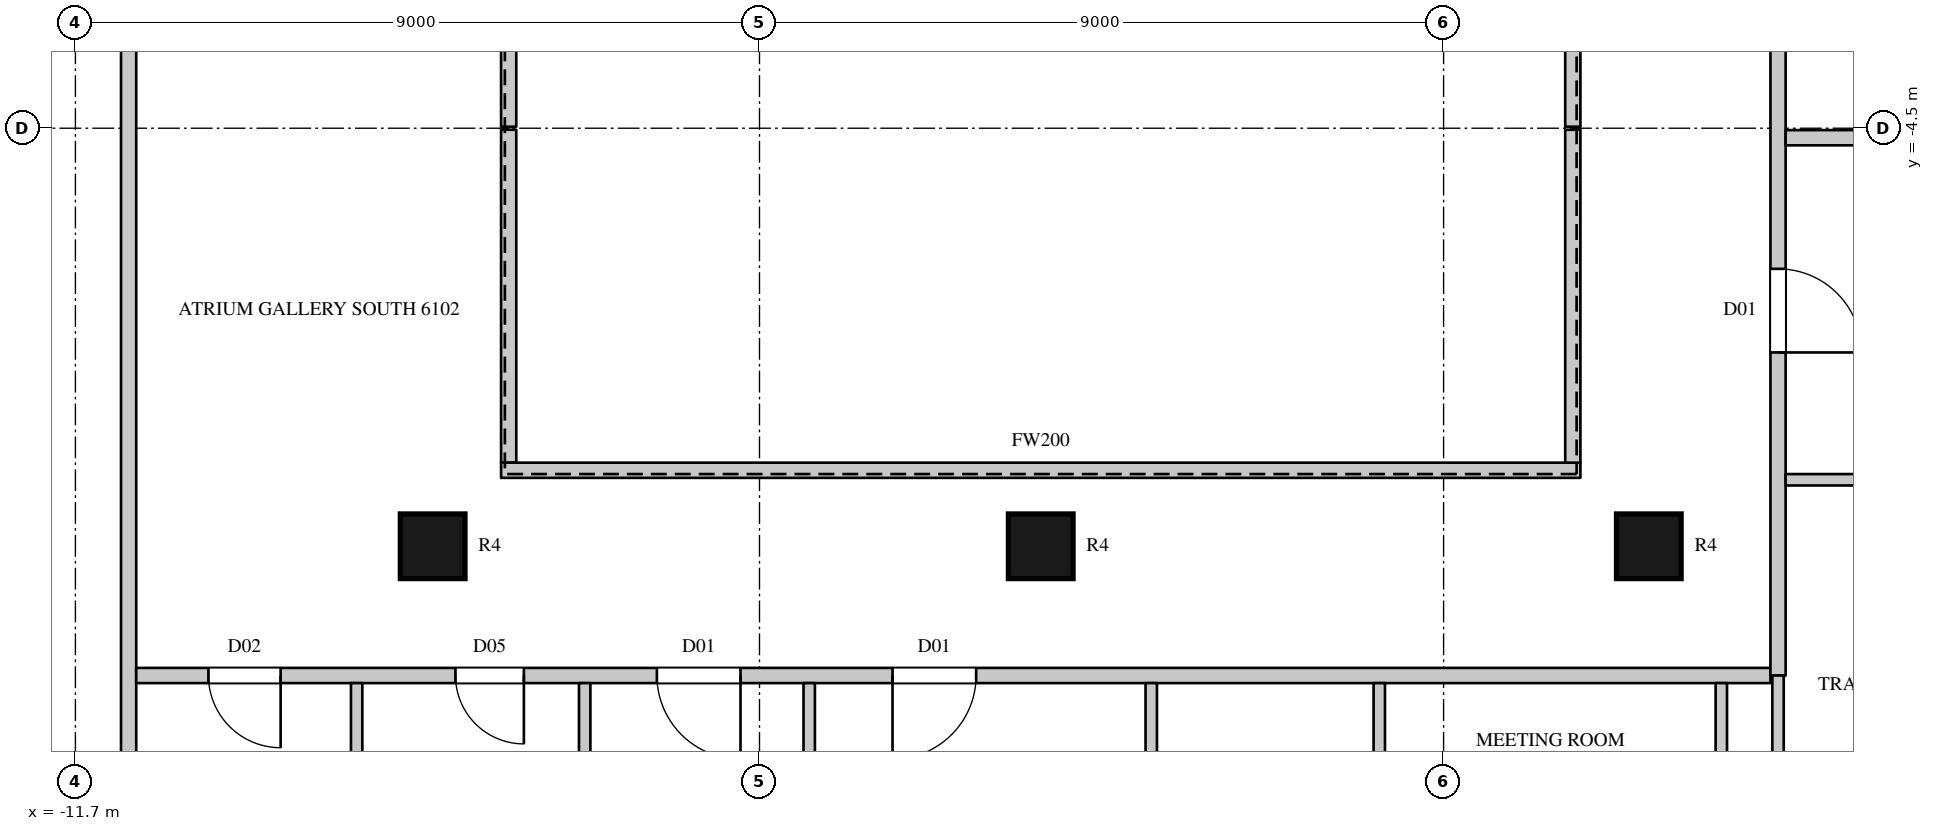
"""IFC4 building model, lengths in metres.
Left out: names, types, materials, properties, quantities, classifications, styles, units other than length and angle.
Written with IfcOpenShell. Run it as: python <this file> out.ifc"""

import sys

from ifc_helpers import new_model, si_unit, direction, frame, frame_2d, origin, origin_2d, place, context, subcontext, project, spatial, rectangle, circle, extrude, element, fill, save


model = new_model("IFC4")
c1 = context("Model", 3, precision=1e-05, world=origin(), true_north=direction((0.0, 1.0)))
c2 = subcontext(c1, "Body", "Model", "MODEL_VIEW")
j1 = project(units=[si_unit("LENGTHUNIT", "METRE"), si_unit("PLANEANGLEUNIT", "RADIAN")], contexts=[c1])
p1 = place(None, origin())
s1 = spatial("IfcSite", under=j1, at=p1, CompositionType="ELEMENT")
p2 = place(p1, origin())
s2 = spatial("IfcBuilding", under=s1, at=p2, CompositionType="ELEMENT")
p3 = place(p2, frame((0.0, 0.0, 272.1)))
s3 = spatial("IfcBuildingStorey", under=s2, at=p3, CompositionType="ELEMENT", Elevation=272.1)
for number, where, z_axis, x_axis in (
    (1, (-7.0, -10.0, 0.0), (0.0, 0.0, 1.0), (1.0, 0.0, 0.0)),
    (2, (1.0, -10.0, 0.0), (0.0, 0.0, 1.0), (1.0, 0.0, 0.0)),
    (3, (9.0, -10.0, 0.0), (0.0, 0.0, 1.0), (1.0, 0.0, 0.0)),
):
    element("IfcColumn", number, at=place(p3, frame(where, z_axis=z_axis, x_axis=x_axis)), inside=s3, PredefinedType="COLUMN", context=c2, shape_type="SweptSolid", body=[
        extrude(circle(Radius=0.425, at=origin_2d()), origin(), (0.0, 0.0, 1.0), 4.1),
    ])
p4 = place(p3, frame((-11.0, -14.8, 0.0), z_axis=(0.0, 0.0, 1.0), x_axis=(0.0, 1.0, 0.0)))
e4 = element("IfcWall", 4, at=p4, inside=s3, PredefinedType="PARTITIONING", context=c2, shape_type="SweptSolid", body=[
    extrude(rectangle(XDim=29.5, YDim=0.2, at=frame_2d((14.75, 0.0))), origin(), (0.0, 0.0, 1.0), 3.8),
])
p5 = place(p4, frame((17.9, 0.0, 0.0)))
e5 = element("IfcOpeningElement", 5, at=p5, cuts=e4, PredefinedType="OPENING", context=c2, shape_type="SweptSolid", body=[
    extrude(rectangle(XDim=1.5, YDim=2.4, at=frame_2d((0.75, 1.2))), frame((0.0, 0.11, 0.0), z_axis=(0.0, -1.0, 0.0), x_axis=(1.0, 0.0, 0.0)), (0.0, 0.0, 1.0), 0.22),
])
p6 = place(p3, frame((-10.9, -11.7, 0.0), z_axis=(0.0, 0.0, 1.0), x_axis=(1.0, 0.0, 0.0)))
e6 = element("IfcWall", 6, at=p6, inside=s3, PredefinedType="PARTITIONING", context=c2, shape_type="SweptSolid", body=[
    extrude(rectangle(XDim=21.5, YDim=0.2, at=frame_2d((10.75, 0.0))), origin(), (0.0, 0.0, 1.0), 3.8),
])
p7 = place(p6, frame((0.95, 0.0, 0.0)))
e7 = element("IfcOpeningElement", 7, at=p7, cuts=e6, PredefinedType="OPENING", context=c2, shape_type="SweptSolid", body=[
    extrude(rectangle(XDim=0.95, YDim=2.2, at=frame_2d((0.475, 1.1))), frame((0.0, 0.11, 0.0), z_axis=(0.0, -1.0, 0.0), x_axis=(1.0, 0.0, 0.0)), (0.0, 0.0, 1.0), 0.22),
])
p8 = place(p6, frame((4.2, 0.0, 0.0)))
e8 = element("IfcOpeningElement", 8, at=p8, cuts=e6, PredefinedType="OPENING", context=c2, shape_type="SweptSolid", body=[
    extrude(rectangle(XDim=0.9, YDim=2.2, at=frame_2d((0.45, 1.1))), frame((0.0, 0.11, 0.0), z_axis=(0.0, -1.0, 0.0), x_axis=(1.0, 0.0, 0.0)), (0.0, 0.0, 1.0), 0.22),
])
p9 = place(p6, frame((6.85, 0.0, 0.0)))
e9 = element("IfcOpeningElement", 9, at=p9, cuts=e6, PredefinedType="OPENING", context=c2, shape_type="SweptSolid", body=[
    extrude(rectangle(XDim=1.1, YDim=2.4, at=frame_2d((0.55, 1.2))), frame((0.0, 0.11, 0.0), z_axis=(0.0, -1.0, 0.0), x_axis=(1.0, 0.0, 0.0)), (0.0, 0.0, 1.0), 0.22),
])
p10 = place(p6, frame((9.95, 0.0, 0.0)))
e10 = element("IfcOpeningElement", 10, at=p10, cuts=e6, PredefinedType="OPENING", context=c2, shape_type="SweptSolid", body=[
    extrude(rectangle(XDim=1.1, YDim=2.4, at=frame_2d((0.55, 1.2))), frame((0.0, 0.11, 0.0), z_axis=(0.0, -1.0, 0.0), x_axis=(1.0, 0.0, 0.0)), (0.0, 0.0, 1.0), 0.22),
])
p11 = place(p3, frame((-6.0, -8.9, 0.0), z_axis=(0.0, 0.0, 1.0), x_axis=(0.0, 1.0, 0.0)))
e11 = element("IfcWall", 11, at=p11, inside=s3, PredefinedType="PARTITIONING", context=c2, shape_type="SweptSolid", body=[
    extrude(rectangle(XDim=4.38, YDim=0.2, at=frame_2d((2.19, 0.0))), origin(), (0.0, 0.0, 1.0), 3.8),
])
p12 = place(p3, frame((-6.1, -9.0, 0.0), z_axis=(0.0, 0.0, 1.0), x_axis=(1.0, 0.0, 0.0)))
e12 = element("IfcWall", 12, at=p12, inside=s3, PredefinedType="PARTITIONING", context=c2, shape_type="SweptSolid", body=[
    extrude(rectangle(XDim=14.2, YDim=0.2, at=frame_2d((7.1, 0.0))), origin(), (0.0, 0.0, 1.0), 3.8),
])
p13 = place(p3, frame((-6.0, -4.48, 0.0), z_axis=(0.0, 0.0, 1.0), x_axis=(0.0, 1.0, 0.0)))
e13 = element("IfcWall", 13, at=p13, inside=s3, PredefinedType="PARTITIONING", context=c2, shape_type="SweptSolid", body=[
    extrude(rectangle(XDim=13.38, YDim=0.2, at=frame_2d((6.69, 0.0))), origin(), (0.0, 0.0, 1.0), 3.8),
])
p14 = place(p3, frame((8.0, -8.9, 0.0), z_axis=(0.0, 0.0, 1.0), x_axis=(0.0, 1.0, 0.0)))
e14 = element("IfcWall", 14, at=p14, inside=s3, PredefinedType="PARTITIONING", context=c2, shape_type="SweptSolid", body=[
    extrude(rectangle(XDim=4.38, YDim=0.2, at=frame_2d((2.19, 0.0))), origin(), (0.0, 0.0, 1.0), 3.8),
])
p15 = place(p3, frame((8.0, -4.48, 0.0), z_axis=(0.0, 0.0, 1.0), x_axis=(0.0, 1.0, 0.0)))
e15 = element("IfcWall", 15, at=p15, inside=s3, PredefinedType="PARTITIONING", context=c2, shape_type="SweptSolid", body=[
    extrude(rectangle(XDim=13.38, YDim=0.2, at=frame_2d((6.69, 0.0))), origin(), (0.0, 0.0, 1.0), 3.8),
])
p16 = place(p3, frame((10.7, -11.7, 0.0), z_axis=(0.0, 0.0, 1.0), x_axis=(0.0, 1.0, 0.0)))
e16 = element("IfcWall", 16, at=p16, inside=s3, PredefinedType="PARTITIONING", context=c2, shape_type="SweptSolid", body=[
    extrude(rectangle(XDim=23.8, YDim=0.2, at=frame_2d((11.9, 0.0))), origin(), (0.0, 0.0, 1.0), 3.8),
])
p17 = place(p16, frame((12.35, 0.0, 0.0)))
e17 = element("IfcOpeningElement", 17, at=p17, cuts=e16, PredefinedType="OPENING", context=c2, shape_type="SweptSolid", body=[
    extrude(rectangle(XDim=1.5, YDim=2.4, at=frame_2d((0.75, 1.2))), frame((0.0, 0.11, 0.0), z_axis=(0.0, -1.0, 0.0), x_axis=(1.0, 0.0, 0.0)), (0.0, 0.0, 1.0), 0.22),
])
p18 = place(p16, frame((19.55, 0.0, 0.0)))
e18 = element("IfcOpeningElement", 18, at=p18, cuts=e16, PredefinedType="OPENING", context=c2, shape_type="SweptSolid", body=[
    extrude(rectangle(XDim=1.1, YDim=2.4, at=frame_2d((0.55, 1.2))), frame((0.0, 0.11, 0.0), z_axis=(0.0, -1.0, 0.0), x_axis=(1.0, 0.0, 0.0)), (0.0, 0.0, 1.0), 0.22),
])
p19 = place(p16, frame((4.25, 0.0, 0.0)))
e19 = element("IfcOpeningElement", 19, at=p19, cuts=e16, PredefinedType="OPENING", context=c2, shape_type="SweptSolid", body=[
    extrude(rectangle(XDim=1.1, YDim=2.4, at=frame_2d((0.55, 1.2))), frame((0.0, 0.11, 0.0), z_axis=(0.0, -1.0, 0.0), x_axis=(1.0, 0.0, 0.0)), (0.0, 0.0, 1.0), 0.22),
])
p20 = place(p3, frame((10.8, -4.625, 0.0), z_axis=(0.0, 0.0, 1.0), x_axis=(1.0, 0.0, 0.0)))
e20 = element("IfcWall", 20, at=p20, inside=s3, PredefinedType="PARTITIONING", context=c2, shape_type="SweptSolid", body=[
    extrude(rectangle(XDim=3.875, YDim=0.2, at=frame_2d((1.938, 0.0))), origin(), (0.0, 0.0, 1.0), 3.8),
])
for number, where, z_axis, x_axis in (
    (21, (-8.0, -24.04, 0.0), (0.0, 0.0, 1.0), (0.0, 1.0, 0.0)),
    (22, (-5.0, -24.04, 0.0), (0.0, 0.0, 1.0), (0.0, 1.0, 0.0)),
):
    element("IfcWall", number, at=place(p3, frame(where, z_axis=z_axis, x_axis=x_axis)), inside=s3, PredefinedType="PARTITIONING", context=c2, shape_type="SweptSolid", body=[
        extrude(rectangle(XDim=12.24, YDim=0.15, at=frame_2d((6.12, 0.0))), origin(), (0.0, 0.0, 1.0), 3.8),
    ])
p21 = place(p3, frame((-2.046, -23.441, 0.0), z_axis=(0.0, 0.0, 1.0), x_axis=(0.0, 1.0, 0.0)))
e23 = element("IfcWall", 23, at=p21, inside=s3, PredefinedType="PARTITIONING", context=c2, shape_type="SweptSolid", body=[
    extrude(rectangle(XDim=11.641, YDim=0.15, at=frame_2d((5.821, 0.0))), origin(), (0.0, 0.0, 1.0), 3.8),
])
p22 = place(p3, frame((2.454, -15.525, 0.0), z_axis=(0.0, 0.0, 1.0), x_axis=(0.0, 1.0, 0.0)))
e24 = element("IfcWall", 24, at=p22, inside=s3, PredefinedType="PARTITIONING", context=c2, shape_type="SweptSolid", body=[
    extrude(rectangle(XDim=3.725, YDim=0.15, at=frame_2d((1.862, 0.0))), origin(), (0.0, 0.0, 1.0), 3.8),
])
p23 = place(p22, frame((1.4, 0.0, 0.0)))
e25 = element("IfcOpeningElement", 25, at=p23, cuts=e24, PredefinedType="OPENING", context=c2, shape_type="SweptSolid", body=[
    extrude(rectangle(XDim=0.95, YDim=2.2, at=frame_2d((0.475, 1.1))), frame((0.0, 0.085, 0.0), z_axis=(0.0, -1.0, 0.0), x_axis=(1.0, 0.0, 0.0)), (0.0, 0.0, 1.0), 0.17),
])
for number, where, z_axis, x_axis in (
    (26, (5.454, -15.525, 0.0), (0.0, 0.0, 1.0), (0.0, 1.0, 0.0)),
    (27, (9.954, -15.525, 0.0), (0.0, 0.0, 1.0), (0.0, 1.0, 0.0)),
):
    element("IfcWall", number, at=place(p3, frame(where, z_axis=z_axis, x_axis=x_axis)), inside=s3, PredefinedType="PARTITIONING", context=c2, shape_type="SweptSolid", body=[
        extrude(rectangle(XDim=3.725, YDim=0.15, at=frame_2d((1.862, 0.0))), origin(), (0.0, 0.0, 1.0), 3.8),
    ])
p24 = place(p3, frame((10.7, -20.828, 0.0), z_axis=(0.0, 0.0, 1.0), x_axis=(0.0, 1.0, 0.0)))
e28 = element("IfcWall", 28, at=p24, inside=s3, PredefinedType="PARTITIONING", context=c2, shape_type="SweptSolid", body=[
    extrude(rectangle(XDim=9.128, YDim=0.15, at=frame_2d((4.564, 0.0))), origin(), (0.0, 0.0, 1.0), 3.8),
])
p25 = place(p3, frame((10.8, -9.125, 0.0), z_axis=(0.0, 0.0, 1.0), x_axis=(1.0, 0.0, 0.0)))
e29 = element("IfcWall", 29, at=p25, inside=s3, PredefinedType="PARTITIONING", context=c2, shape_type="SweptSolid", body=[
    extrude(rectangle(XDim=3.875, YDim=0.15, at=frame_2d((1.938, 0.0))), origin(), (0.0, 0.0, 1.0), 3.8),
])
p26 = place(p25, frame((2.65, 0.0, 0.0)))
e30 = element("IfcOpeningElement", 30, at=p26, cuts=e29, PredefinedType="OPENING", context=c2, shape_type="SweptSolid", body=[
    extrude(rectangle(XDim=0.95, YDim=2.2, at=frame_2d((0.475, 1.1))), frame((0.0, 0.085, 0.0), z_axis=(0.0, -1.0, 0.0), x_axis=(1.0, 0.0, 0.0)), (0.0, 0.0, 1.0), 0.17),
])
p27 = place(p7, origin())
e31 = element("IfcDoor", 31, at=p27, inside=s3, OperationType="SINGLE_SWING_LEFT", PredefinedType="DOOR", context=c2, shape_type="SweptSolid", body=[
    extrude(rectangle(XDim=0.95, YDim=2.2, at=frame_2d((0.475, 1.1))), frame((0.0, 0.025, 0.0), z_axis=(0.0, -1.0, 0.0), x_axis=(1.0, 0.0, 0.0)), (0.0, 0.0, 1.0), 0.05),
])
fill(e7, e31)
p28 = place(p8, origin())
e32 = element("IfcDoor", 32, at=p28, inside=s3, OperationType="SINGLE_SWING_LEFT", PredefinedType="DOOR", context=c2, shape_type="SweptSolid", body=[
    extrude(rectangle(XDim=0.9, YDim=2.2, at=frame_2d((0.45, 1.1))), frame((0.0, 0.025, 0.0), z_axis=(0.0, -1.0, 0.0), x_axis=(1.0, 0.0, 0.0)), (0.0, 0.0, 1.0), 0.05),
])
fill(e8, e32)
p29 = place(p9, origin())
e33 = element("IfcDoor", 33, at=p29, inside=s3, OperationType="SINGLE_SWING_LEFT", PredefinedType="DOOR", context=c2, shape_type="SweptSolid", body=[
    extrude(rectangle(XDim=1.1, YDim=2.4, at=frame_2d((0.55, 1.2))), frame((0.0, 0.025, 0.0), z_axis=(0.0, -1.0, 0.0), x_axis=(1.0, 0.0, 0.0)), (0.0, 0.0, 1.0), 0.05),
])
fill(e9, e33)
p30 = place(p10, origin())
e34 = element("IfcDoor", 34, at=p30, inside=s3, OperationType="SINGLE_SWING_RIGHT", PredefinedType="DOOR", context=c2, shape_type="SweptSolid", body=[
    extrude(rectangle(XDim=1.1, YDim=2.4, at=frame_2d((0.55, 1.2))), frame((0.0, 0.025, 0.0), z_axis=(0.0, -1.0, 0.0), x_axis=(1.0, 0.0, 0.0)), (0.0, 0.0, 1.0), 0.05),
])
fill(e10, e34)
p31 = place(p19, origin())
e35 = element("IfcDoor", 35, at=p31, inside=s3, OperationType="SINGLE_SWING_RIGHT", PredefinedType="DOOR", context=c2, shape_type="SweptSolid", body=[
    extrude(rectangle(XDim=1.1, YDim=2.4, at=frame_2d((0.55, 1.2))), frame((0.0, 0.025, 0.0), z_axis=(0.0, -1.0, 0.0), x_axis=(1.0, 0.0, 0.0)), (0.0, 0.0, 1.0), 0.05),
])
fill(e19, e35)
save(model, sys.argv[1])
